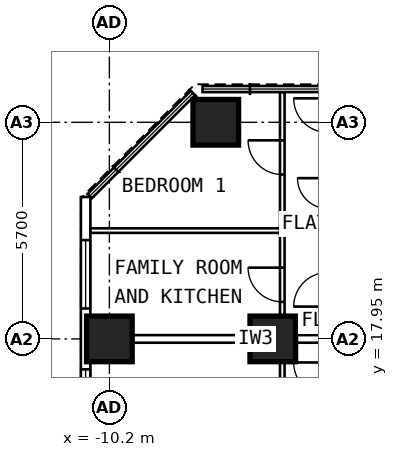
"""IFC4 building model, lengths in metres.
Left out: names, types, materials, properties, quantities, classifications, styles, units other than length and angle.
Written with IfcOpenShell. Run it as: python <this file> out.ifc"""

import sys

from ifc_helpers import new_model, si_unit, direction, frame, frame_2d, origin, origin_2d, place, context, subcontext, project, spatial, rectangle, extrude, element, fill, save


model = new_model("IFC4")
c1 = context("Model", 3, precision=1e-05, world=origin(), true_north=direction((0.0, 1.0)))
c2 = subcontext(c1, "Body", "Model", "MODEL_VIEW")
j1 = project(units=[si_unit("LENGTHUNIT", "METRE"), si_unit("PLANEANGLEUNIT", "RADIAN")], contexts=[c1])
p1 = place(None, origin())
s1 = spatial("IfcSite", under=j1, at=p1, CompositionType="ELEMENT")
p2 = place(p1, origin())
s2 = spatial("IfcBuilding", under=s1, at=p2, CompositionType="ELEMENT")
p3 = place(p2, frame((0.0, 0.0, 127.4)))
s3 = spatial("IfcBuildingStorey", under=s2, at=p3, CompositionType="ELEMENT", Elevation=127.4)
for number, where, z_axis, x_axis in (
    (1, (-10.2, 17.95, 0.0), (0.0, 0.0, 1.0), (0.0, 1.0, 0.0)),
    (2, (-7.4, 23.65, 0.0), (0.0, 0.0, 1.0), (0.0, 1.0, 0.0)),
    (3, (-5.9, 17.95, 0.0), (0.0, 0.0, 1.0), (0.0, 1.0, 0.0)),
):
    element("IfcColumn", number, at=place(p3, frame(where, z_axis=z_axis, x_axis=x_axis)), inside=s3, PredefinedType="COLUMN", context=c2, shape_type="SweptSolid", body=[
        extrude(rectangle(XDim=1.2, YDim=1.2, at=origin_2d()), origin(), (0.0, 0.0, 1.0), 3.6),
    ])
p4 = place(p3, frame((-10.825, 6.409, 0.0), z_axis=(0.0, 0.0, 1.0), x_axis=(0.0, 1.0, 0.0)))
e4 = element("IfcWall", 4, at=p4, inside=s3, PredefinedType="SOLIDWALL", context=c2, shape_type="SweptSolid", body=[
    extrude(rectangle(XDim=15.276, YDim=0.25, at=frame_2d((7.638, 0.0))), origin(), (0.0, 0.0, 1.0), 3.35),
])
p5 = place(p4, frame((0.941, 0.0, 0.8)))
e5 = element("IfcOpeningElement", 5, at=p5, cuts=e4, PredefinedType="OPENING", context=c2, shape_type="SweptSolid", body=[
    extrude(rectangle(XDim=1.8, YDim=1.8, at=frame_2d((0.9, 0.9))), frame((0.0, 0.137, 0.0), z_axis=(0.0, -1.0, 0.0), x_axis=(1.0, 0.0, 0.0)), (0.0, 0.0, 1.0), 0.274),
])
p6 = place(p4, frame((3.241, 0.0, 0.8)))
e6 = element("IfcOpeningElement", 6, at=p6, cuts=e4, PredefinedType="OPENING", context=c2, shape_type="SweptSolid", body=[
    extrude(rectangle(XDim=1.8, YDim=1.8, at=frame_2d((0.9, 0.9))), frame((0.0, 0.137, 0.0), z_axis=(0.0, -1.0, 0.0), x_axis=(1.0, 0.0, 0.0)), (0.0, 0.0, 1.0), 0.274),
])
p7 = place(p4, frame((6.641, 0.0, 0.8)))
e7 = element("IfcOpeningElement", 7, at=p7, cuts=e4, PredefinedType="OPENING", context=c2, shape_type="SweptSolid", body=[
    extrude(rectangle(XDim=1.8, YDim=1.8, at=frame_2d((0.9, 0.9))), frame((0.0, 0.137, 0.0), z_axis=(0.0, -1.0, 0.0), x_axis=(1.0, 0.0, 0.0)), (0.0, 0.0, 1.0), 0.274),
])
p8 = place(p4, frame((8.941, 0.0, 0.8)))
e8 = element("IfcOpeningElement", 8, at=p8, cuts=e4, PredefinedType="OPENING", context=c2, shape_type="SweptSolid", body=[
    extrude(rectangle(XDim=1.8, YDim=1.8, at=frame_2d((0.9, 0.9))), frame((0.0, 0.137, 0.0), z_axis=(0.0, -1.0, 0.0), x_axis=(1.0, 0.0, 0.0)), (0.0, 0.0, 1.0), 0.274),
])
p9 = place(p4, frame((12.341, 0.0, 0.8)))
e9 = element("IfcOpeningElement", 9, at=p9, cuts=e4, PredefinedType="OPENING", context=c2, shape_type="SweptSolid", body=[
    extrude(rectangle(XDim=1.8, YDim=1.8, at=frame_2d((0.9, 0.9))), frame((0.0, 0.137, 0.0), z_axis=(0.0, -1.0, 0.0), x_axis=(1.0, 0.0, 0.0)), (0.0, 0.0, 1.0), 0.274),
])
p10 = place(p3, frame((-5.65, 9.6, 0.0), z_axis=(0.0, 0.0, 1.0), x_axis=(0.0, 1.0, 0.0)))
e10 = element("IfcWall", 10, at=p10, inside=s3, PredefinedType="PARTITIONING", context=c2, shape_type="SweptSolid", body=[
    extrude(rectangle(XDim=8.1, YDim=0.12, at=frame_2d((4.05, 0.0))), origin(), (0.0, 0.0, 1.0), 3.35),
])
p11 = place(p10, frame((5.05, 0.0, 0.0)))
e11 = element("IfcOpeningElement", 11, at=p11, cuts=e10, PredefinedType="OPENING", context=c2, shape_type="SweptSolid", body=[
    extrude(rectangle(XDim=0.9, YDim=2.1, at=frame_2d((0.45, 1.05))), frame((0.0, 0.072, 0.0), z_axis=(0.0, -1.0, 0.0), x_axis=(1.0, 0.0, 0.0)), (0.0, 0.0, 1.0), 0.144),
])
p12 = place(p3, frame((-5.65, 18.05, 0.0), z_axis=(0.0, 0.0, 1.0), x_axis=(0.0, 1.0, 0.0)))
e12 = element("IfcWall", 12, at=p12, inside=s3, PredefinedType="PARTITIONING", context=c2, shape_type="SweptSolid", body=[
    extrude(rectangle(XDim=6.395, YDim=0.12, at=frame_2d((3.198, 0.0))), origin(), (0.0, 0.0, 1.0), 3.35),
])
p13 = place(p12, frame((0.875, 0.0, 0.0)))
e13 = element("IfcOpeningElement", 13, at=p13, cuts=e12, PredefinedType="OPENING", context=c2, shape_type="SweptSolid", body=[
    extrude(rectangle(XDim=0.9, YDim=2.1, at=frame_2d((0.45, 1.05))), frame((0.0, 0.072, 0.0), z_axis=(0.0, -1.0, 0.0), x_axis=(1.0, 0.0, 0.0)), (0.0, 0.0, 1.0), 0.144),
])
p14 = place(p12, frame((4.225, 0.0, 0.0)))
e14 = element("IfcOpeningElement", 14, at=p14, cuts=e12, PredefinedType="OPENING", context=c2, shape_type="SweptSolid", body=[
    extrude(rectangle(XDim=0.9, YDim=2.1, at=frame_2d((0.45, 1.05))), frame((0.0, 0.072, 0.0), z_axis=(0.0, -1.0, 0.0), x_axis=(1.0, 0.0, 0.0)), (0.0, 0.0, 1.0), 0.144),
])
p15 = place(p3, frame((-5.71, 20.8, 0.0), z_axis=(0.0, 0.0, 1.0), x_axis=(-1.0, 0.0, 0.0)))
e15 = element("IfcWall", 15, at=p15, inside=s3, PredefinedType="PARTITIONING", context=c2, shape_type="SweptSolid", body=[
    extrude(rectangle(XDim=4.99, YDim=0.12, at=frame_2d((2.495, 0.0))), origin(), (0.0, 0.0, 1.0), 3.35),
])
p16 = place(p3, frame((-2.0, 17.95, 0.0), z_axis=(0.0, 0.0, 1.0), x_axis=(-1.0, 0.0, 0.0)))
e16 = element("IfcWall", 16, at=p16, inside=s3, PredefinedType="PARTITIONING", context=c2, shape_type="SweptSolid", body=[
    extrude(rectangle(XDim=8.7, YDim=0.2, at=frame_2d((4.35, 0.0))), origin(), (0.0, 0.0, 1.0), 2.45),
])
p17 = place(p8, origin())
e17 = element("IfcWindow", 17, at=p17, inside=s3, PartitioningType="SINGLE_PANEL", PredefinedType="WINDOW", context=c2, shape_type="SweptSolid", body=[
    extrude(rectangle(XDim=1.8, YDim=1.8, at=frame_2d((0.9, 0.9))), frame((0.0, 0.03, 0.0), z_axis=(0.0, -1.0, 0.0), x_axis=(1.0, 0.0, 0.0)), (0.0, 0.0, 1.0), 0.06),
])
fill(e8, e17)
p18 = place(p9, origin())
e18 = element("IfcWindow", 18, at=p18, inside=s3, PartitioningType="SINGLE_PANEL", PredefinedType="WINDOW", context=c2, shape_type="SweptSolid", body=[
    extrude(rectangle(XDim=1.8, YDim=1.8, at=frame_2d((0.9, 0.9))), frame((0.0, 0.03, 0.0), z_axis=(0.0, -1.0, 0.0), x_axis=(1.0, 0.0, 0.0)), (0.0, 0.0, 1.0), 0.06),
])
fill(e9, e18)
p19 = place(p13, origin())
e19 = element("IfcDoor", 19, at=p19, inside=s3, OperationType="SINGLE_SWING_RIGHT", PredefinedType="DOOR", context=c2, shape_type="SweptSolid", body=[
    extrude(rectangle(XDim=0.9, YDim=2.1, at=frame_2d((0.45, 1.05))), frame((0.0, 0.025, 0.0), z_axis=(0.0, -1.0, 0.0), x_axis=(1.0, 0.0, 0.0)), (0.0, 0.0, 1.0), 0.05),
])
fill(e13, e19)
p20 = place(p14, origin())
e20 = element("IfcDoor", 20, at=p20, inside=s3, OperationType="SINGLE_SWING_RIGHT", PredefinedType="DOOR", context=c2, shape_type="SweptSolid", body=[
    extrude(rectangle(XDim=0.9, YDim=2.1, at=frame_2d((0.45, 1.05))), frame((0.0, 0.025, 0.0), z_axis=(0.0, -1.0, 0.0), x_axis=(1.0, 0.0, 0.0)), (0.0, 0.0, 1.0), 0.05),
])
fill(e14, e20)
save(model, sys.argv[1])
